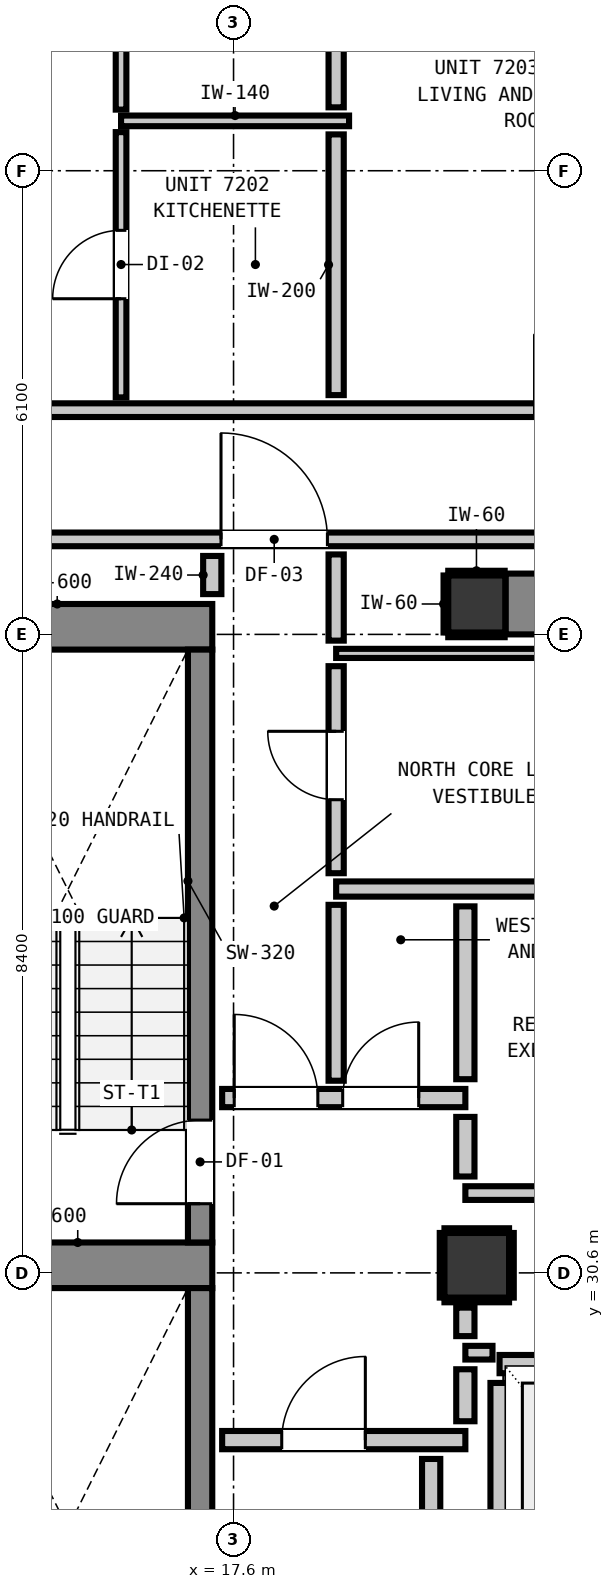
"""IFC4 building model, lengths in metres.
Left out: names, types, materials, properties, quantities, classifications, styles, units other than length and angle.
Written with IfcOpenShell. Run it as: python <this file> out.ifc"""

import sys

from ifc_helpers import new_model, si_unit, direction, frame, frame_2d, origin, origin_2d, place, context, subcontext, project, spatial, rectangle, extrude, element, fill, save


model = new_model("IFC4")
c1 = context("Model", 3, precision=1e-05, world=origin(), true_north=direction((0.0, 1.0)))
c2 = subcontext(c1, "Body", "Model", "MODEL_VIEW")
j1 = project(units=[si_unit("LENGTHUNIT", "METRE"), si_unit("PLANEANGLEUNIT", "RADIAN")], contexts=[c1])
p1 = place(None, origin())
s1 = spatial("IfcSite", under=j1, at=p1, CompositionType="ELEMENT")
p2 = place(p1, origin())
s2 = spatial("IfcBuilding", under=s1, at=p2, CompositionType="ELEMENT")
p3 = place(p2, frame((0.0, 0.0, 247.88)))
s3 = spatial("IfcBuildingStorey", under=s2, at=p3, CompositionType="ELEMENT", Elevation=247.88)
p4 = place(p3, frame((20.8, 39.4, 0.0), z_axis=(0.0, 0.0, 1.0), x_axis=(1.0, 0.0, 0.0)))
e1 = element("IfcColumn", 1, at=p4, inside=s3, PredefinedType="COLUMN", context=c2, shape_type="SweptSolid", body=[
    extrude(rectangle(XDim=0.75, YDim=0.75, at=origin_2d()), origin(), (0.0, 0.0, 1.0), 3.32),
])
p5 = place(p3, frame((13.24, 39.1, 0.0), z_axis=(0.0, 0.0, 1.0), x_axis=(1.0, 0.0, 0.0)))
e2 = element("IfcWall", 2, at=p5, inside=s3, PredefinedType="SHEAR", context=c2, shape_type="SweptSolid", body=[
    extrude(rectangle(XDim=4.08, YDim=0.6, at=frame_2d((2.04, 0.0))), origin(), (0.0, 0.0, 1.0), 3.32),
])
p6 = place(p3, frame((13.78, 30.7, 0.0), z_axis=(0.0, 0.0, 1.0), x_axis=(1.0, 0.0, 0.0)))
e3 = element("IfcWall", 3, at=p6, inside=s3, PredefinedType="SHEAR", context=c2, shape_type="SweptSolid", body=[
    extrude(rectangle(XDim=3.54, YDim=0.6, at=frame_2d((1.77, 0.0))), origin(), (0.0, 0.0, 1.0), 3.32),
])
p7 = place(p3, frame((21.18, 39.4, 0.0), z_axis=(0.0, 0.0, 1.0), x_axis=(1.0, 0.0, 0.0)))
e4 = element("IfcWall", 4, at=p7, inside=s3, PredefinedType="SHEAR", context=c2, shape_type="SweptSolid", body=[
    extrude(rectangle(XDim=7.64, YDim=0.8, at=frame_2d((3.82, 0.0))), origin(), (0.0, 0.0, 1.0), 3.32),
])
p8 = place(p3, frame((17.16, 31.0, 0.0), z_axis=(0.0, 0.0, 1.0), x_axis=(0.0, 1.0, 0.0)))
e5 = element("IfcWall", 5, at=p8, inside=s3, PredefinedType="SHEAR", context=c2, shape_type="SweptSolid", body=[
    extrude(rectangle(XDim=7.8, YDim=0.32, at=frame_2d((3.9, 0.0))), origin(), (0.0, 0.0, 1.0), 3.32),
])
p9 = place(p8, frame((0.51, 0.0, 0.0)))
e6 = element("IfcOpeningElement", 6, at=p9, cuts=e5, PredefinedType="OPENING", context=c2, shape_type="SweptSolid", body=[
    extrude(rectangle(XDim=1.1, YDim=2.15, at=frame_2d((0.55, 1.075))), frame((0.0, 0.17, 0.0), z_axis=(0.0, -1.0, 0.0), x_axis=(1.0, 0.0, 0.0)), (0.0, 0.0, 1.0), 0.34),
])
p10 = place(p3, frame((17.16, 22.4, 0.0), z_axis=(0.0, 0.0, 1.0), x_axis=(0.0, 1.0, 0.0)))
e7 = element("IfcWall", 7, at=p10, inside=s3, PredefinedType="SHEAR", context=c2, shape_type="SweptSolid", body=[
    extrude(rectangle(XDim=8.0, YDim=0.32, at=frame_2d((4.0, 0.0))), origin(), (0.0, 0.0, 1.0), 3.32),
])
p11 = place(p10, frame((0.39, 0.0, 0.0)))
e8 = element("IfcOpeningElement", 8, at=p11, cuts=e7, PredefinedType="OPENING", context=c2, shape_type="SweptSolid", body=[
    extrude(rectangle(XDim=1.1, YDim=2.15, at=frame_2d((0.55, 1.075))), frame((0.0, 0.17, 0.0), z_axis=(0.0, -1.0, 0.0), x_axis=(1.0, 0.0, 0.0)), (0.0, 0.0, 1.0), 0.34),
])
p12 = place(p3, frame((20.8, 30.7, 0.0), z_axis=(0.0, 0.0, 1.0), x_axis=(1.0, 0.0, 0.0)))
e9 = element("IfcColumn", 9, at=p12, inside=s3, PredefinedType="COLUMN", context=c2, shape_type="SweptSolid", body=[
    extrude(rectangle(XDim=0.85, YDim=0.85, at=origin_2d()), origin(), (0.0, 0.0, 1.0), 3.32),
])
p13 = place(p3, frame((21.1, 29.4, 0.0), z_axis=(0.0, 0.0, 1.0), x_axis=(1.0, 0.0, 0.0)))
e10 = element("IfcWall", 10, at=p13, inside=s3, PredefinedType="PARTITIONING", context=c2, shape_type="SweptSolid", body=[
    extrude(rectangle(XDim=2.2, YDim=0.24, at=frame_2d((1.1, 0.0))), origin(), (0.0, 0.0, 1.0), 2.9),
])
p14 = place(p3, frame((21.1, 27.048, 0.0), z_axis=(0.0, 0.0, 1.0), x_axis=(0.0, 1.0, 0.0)))
e11 = element("IfcWall", 11, at=p14, inside=s3, PredefinedType="PARTITIONING", context=c2, shape_type="SweptSolid", body=[
    extrude(rectangle(XDim=2.104, YDim=0.24, at=frame_2d((1.052, 0.0))), origin(), (0.0, 0.0, 1.0), 0.905),
])
p15 = place(p3, frame((17.45, 28.4, 0.0), z_axis=(0.0, 0.0, 1.0), x_axis=(1.0, 0.0, 0.0)))
e12 = element("IfcWall", 12, at=p15, inside=s3, PredefinedType="PARTITIONING", context=c2, shape_type="SweptSolid", body=[
    extrude(rectangle(XDim=3.2, YDim=0.24, at=frame_2d((1.6, 0.0))), origin(), (0.0, 0.0, 1.0), 2.9),
])
p16 = place(p15, frame((0.784, 0.0, 0.0)))
e13 = element("IfcOpeningElement", 13, at=p16, cuts=e12, PredefinedType="OPENING", context=c2, shape_type="SweptSolid", body=[
    extrude(rectangle(XDim=1.1, YDim=2.15, at=frame_2d((0.55, 1.075))), frame((0.0, 0.13, 0.0), z_axis=(0.0, -1.0, 0.0), x_axis=(1.0, 0.0, 0.0)), (0.0, 0.0, 1.0), 0.26),
])
p17 = place(p3, frame((17.45, 32.9, 0.0), z_axis=(0.0, 0.0, 1.0), x_axis=(1.0, 0.0, 0.0)))
e14 = element("IfcWall", 14, at=p17, inside=s3, PredefinedType="PARTITIONING", context=c2, shape_type="SweptSolid", body=[
    extrude(rectangle(XDim=3.2, YDim=0.24, at=frame_2d((1.6, 0.0))), origin(), (0.0, 0.0, 1.0), 2.9),
])
p18 = place(p17, frame((0.159, 0.0, 0.0)))
e15 = element("IfcOpeningElement", 15, at=p18, cuts=e14, PredefinedType="OPENING", context=c2, shape_type="SweptSolid", body=[
    extrude(rectangle(XDim=1.1, YDim=2.15, at=frame_2d((0.55, 1.075))), frame((0.0, 0.13, 0.0), z_axis=(0.0, -1.0, 0.0), x_axis=(1.0, 0.0, 0.0)), (0.0, 0.0, 1.0), 0.26),
])
p19 = place(p17, frame((1.586, 0.0, 0.0)))
e16 = element("IfcOpeningElement", 16, at=p19, cuts=e14, PredefinedType="OPENING", context=c2, shape_type="SweptSolid", body=[
    extrude(rectangle(XDim=1.0, YDim=2.15, at=frame_2d((0.5, 1.075))), frame((0.0, 0.13, 0.0), z_axis=(0.0, -1.0, 0.0), x_axis=(1.0, 0.0, 0.0)), (0.0, 0.0, 1.0), 0.26),
])
p20 = place(p3, frame((18.95, 35.65, 0.0), z_axis=(0.0, 0.0, 1.0), x_axis=(1.0, 0.0, 0.0)))
e17 = element("IfcWall", 17, at=p20, inside=s3, PredefinedType="PARTITIONING", context=c2, shape_type="SweptSolid", body=[
    extrude(rectangle(XDim=11.025, YDim=0.2, at=frame_2d((5.513, 0.0))), origin(), (0.0, 0.0, 1.0), 2.9),
])
p21 = place(p3, frame((20.65, 29.55, 0.0), z_axis=(0.0, 0.0, 1.0), x_axis=(1.0, 0.0, 0.0)))
e18 = element("IfcWall", 18, at=p21, inside=s3, PredefinedType="PARTITIONING", context=c2, shape_type="SweptSolid", body=[
    extrude(rectangle(XDim=0.357, YDim=0.18, at=frame_2d((0.179, 0.0))), origin(), (0.0, 0.0, 1.0), 2.9),
])
p22 = place(p3, frame((20.65, 31.65, 0.0), z_axis=(0.0, 0.0, 1.0), x_axis=(1.0, 0.0, 0.0)))
e19 = element("IfcWall", 19, at=p22, inside=s3, PredefinedType="PARTITIONING", context=c2, shape_type="SweptSolid", body=[
    extrude(rectangle(XDim=7.7, YDim=0.18, at=frame_2d((3.85, 0.0))), origin(), (0.0, 0.0, 1.0), 2.9),
])
p23 = place(p22, frame((4.673, 0.0, 0.0)))
e20 = element("IfcOpeningElement", 20, at=p23, cuts=e19, PredefinedType="OPENING", context=c2, shape_type="SweptSolid", body=[
    extrude(rectangle(XDim=0.9, YDim=2.1, at=frame_2d((0.45, 1.05))), frame((0.0, 0.1, 0.0), z_axis=(0.0, -1.0, 0.0), x_axis=(1.0, 0.0, 0.0)), (0.0, 0.0, 1.0), 0.2),
])
p24 = place(p3, frame((10.787, 40.25, 0.0), z_axis=(0.0, 0.0, 1.0), x_axis=(1.0, 0.0, 0.0)))
e21 = element("IfcWall", 21, at=p24, inside=s3, PredefinedType="PARTITIONING", context=c2, shape_type="SweptSolid", body=[
    extrude(rectangle(XDim=36.626, YDim=0.18, at=frame_2d((18.313, 0.0))), origin(), (0.0, 0.0, 1.0), 2.9),
])
p25 = place(p24, frame((6.648, 0.0, 0.0)))
e22 = element("IfcOpeningElement", 22, at=p25, cuts=e21, PredefinedType="OPENING", context=c2, shape_type="SweptSolid", body=[
    extrude(rectangle(XDim=1.4, YDim=2.15, at=frame_2d((0.7, 1.075))), frame((0.0, 0.1, 0.0), z_axis=(0.0, -1.0, 0.0), x_axis=(1.0, 0.0, 0.0)), (0.0, 0.0, 1.0), 0.2),
])
p26 = place(p24, frame((31.314, 0.0, 0.0)))
e23 = element("IfcOpeningElement", 23, at=p26, cuts=e21, PredefinedType="OPENING", context=c2, shape_type="SweptSolid", body=[
    extrude(rectangle(XDim=0.9, YDim=2.1, at=frame_2d((0.45, 1.05))), frame((0.0, 0.1, 0.0), z_axis=(0.0, -1.0, 0.0), x_axis=(1.0, 0.0, 0.0)), (0.0, 0.0, 1.0), 0.2),
])
p27 = place(p3, frame((10.787, 41.95, 0.0), z_axis=(0.0, 0.0, 1.0), x_axis=(1.0, 0.0, 0.0)))
e24 = element("IfcWall", 24, at=p27, inside=s3, PredefinedType="PARTITIONING", context=c2, shape_type="SweptSolid", body=[
    extrude(rectangle(XDim=36.626, YDim=0.18, at=frame_2d((18.313, 0.0))), origin(), (0.0, 0.0, 1.0), 2.9),
])
p28 = place(p27, frame((3.397, 0.0, 0.0)))
e25 = element("IfcOpeningElement", 25, at=p28, cuts=e24, PredefinedType="OPENING", context=c2, shape_type="SweptSolid", body=[
    extrude(rectangle(XDim=1.0, YDim=2.15, at=frame_2d((0.5, 1.075))), frame((0.0, 0.1, 0.0), z_axis=(0.0, -1.0, 0.0), x_axis=(1.0, 0.0, 0.0)), (0.0, 0.0, 1.0), 0.2),
])
p29 = place(p27, frame((10.773, 0.0, 0.0)))
e26 = element("IfcOpeningElement", 26, at=p29, cuts=e24, PredefinedType="OPENING", context=c2, shape_type="SweptSolid", body=[
    extrude(rectangle(XDim=1.0, YDim=2.15, at=frame_2d((0.5, 1.075))), frame((0.0, 0.1, 0.0), z_axis=(0.0, -1.0, 0.0), x_axis=(1.0, 0.0, 0.0)), (0.0, 0.0, 1.0), 0.2),
])
p30 = place(p27, frame((19.136, 0.0, 0.0)))
e27 = element("IfcOpeningElement", 27, at=p30, cuts=e24, PredefinedType="OPENING", context=c2, shape_type="SweptSolid", body=[
    extrude(rectangle(XDim=1.0, YDim=2.15, at=frame_2d((0.5, 1.075))), frame((0.0, 0.1, 0.0), z_axis=(0.0, -1.0, 0.0), x_axis=(1.0, 0.0, 0.0)), (0.0, 0.0, 1.0), 0.2),
])
p31 = place(p27, frame((28.323, 0.0, 0.0)))
e28 = element("IfcOpeningElement", 28, at=p31, cuts=e24, PredefinedType="OPENING", context=c2, shape_type="SweptSolid", body=[
    extrude(rectangle(XDim=1.0, YDim=2.15, at=frame_2d((0.5, 1.075))), frame((0.0, 0.1, 0.0), z_axis=(0.0, -1.0, 0.0), x_axis=(1.0, 0.0, 0.0)), (0.0, 0.0, 1.0), 0.2),
])
p32 = place(p3, frame((16.12, 45.756, 0.0), z_axis=(0.0, 0.0, 1.0), x_axis=(1.0, 0.0, 0.0)))
e29 = element("IfcWall", 29, at=p32, inside=s3, PredefinedType="PARTITIONING", context=c2, shape_type="SweptSolid", body=[
    extrude(rectangle(XDim=3.0, YDim=0.14, at=frame_2d((1.5, 0.0))), origin(), (0.0, 0.0, 1.0), 2.9),
])
p33 = place(p3, frame((18.95, 38.75, 0.0), z_axis=(0.0, 0.0, 1.0), x_axis=(1.0, 0.0, 0.0)))
e30 = element("IfcWall", 30, at=p33, inside=s3, PredefinedType="PARTITIONING", context=c2, shape_type="SweptSolid", body=[
    extrude(rectangle(XDim=13.56, YDim=0.12, at=frame_2d((6.78, 0.0))), origin(), (0.0, 0.0, 1.0), 0.905),
])
p34 = place(p3, frame((17.32, 39.53, 0.0), z_axis=(0.0, 0.0, 1.0), x_axis=(0.0, 1.0, 0.0)))
e31 = element("IfcWall", 31, at=p34, inside=s3, PredefinedType="PARTITIONING", context=c2, shape_type="SweptSolid", body=[
    extrude(rectangle(XDim=0.502, YDim=0.24, at=frame_2d((0.251, 0.0))), origin(), (0.0, 0.0, 1.0), 2.9),
])
p35 = place(p3, frame((20.2, 21.398, 0.0), z_axis=(0.0, 0.0, 1.0), x_axis=(0.0, 1.0, 0.0)))
e32 = element("IfcWall", 32, at=p35, inside=s3, PredefinedType="PARTITIONING", context=c2, shape_type="SweptSolid", body=[
    extrude(rectangle(XDim=6.754, YDim=0.24, at=frame_2d((3.377, 0.0))), origin(), (0.0, 0.0, 1.0), 0.905),
])
p36 = place(p3, frame((20.65, 28.648, 0.0), z_axis=(0.0, 0.0, 1.0), x_axis=(0.0, 1.0, 0.0)))
e33 = element("IfcWall", 33, at=p36, inside=s3, PredefinedType="PARTITIONING", context=c2, shape_type="SweptSolid", body=[
    extrude(rectangle(XDim=0.684, YDim=0.24, at=frame_2d((0.342, 0.0))), origin(), (0.0, 0.0, 1.0), 0.905),
])
p37 = place(p3, frame((20.65, 29.768, 0.0), z_axis=(0.0, 0.0, 1.0), x_axis=(0.0, 1.0, 0.0)))
e34 = element("IfcWall", 34, at=p37, inside=s3, PredefinedType="PARTITIONING", context=c2, shape_type="SweptSolid", body=[
    extrude(rectangle(XDim=0.375, YDim=0.24, at=frame_2d((0.188, 0.0))), origin(), (0.0, 0.0, 1.0), 0.905),
])
p38 = place(p3, frame((20.65, 31.868, 0.0), z_axis=(0.0, 0.0, 1.0), x_axis=(0.0, 1.0, 0.0)))
e35 = element("IfcWall", 35, at=p38, inside=s3, PredefinedType="PARTITIONING", context=c2, shape_type="SweptSolid", body=[
    extrude(rectangle(XDim=0.784, YDim=0.24, at=frame_2d((0.392, 0.0))), origin(), (0.0, 0.0, 1.0), 0.905),
])
p39 = place(p3, frame((20.65, 33.148, 0.0), z_axis=(0.0, 0.0, 1.0), x_axis=(0.0, 1.0, 0.0)))
e36 = element("IfcWall", 36, at=p39, inside=s3, PredefinedType="PARTITIONING", context=c2, shape_type="SweptSolid", body=[
    extrude(rectangle(XDim=2.274, YDim=0.24, at=frame_2d((1.137, 0.0))), origin(), (0.0, 0.0, 1.0), 0.905),
])
p40 = place(p3, frame((18.95, 33.128, 0.0), z_axis=(0.0, 0.0, 1.0), x_axis=(0.0, 1.0, 0.0)))
e37 = element("IfcWall", 37, at=p40, inside=s3, PredefinedType="PARTITIONING", context=c2, shape_type="SweptSolid", body=[
    extrude(rectangle(XDim=2.314, YDim=0.2, at=frame_2d((1.157, 0.0))), origin(), (0.0, 0.0, 1.0), 2.9),
])
p41 = place(p3, frame((18.95, 35.858, 0.0), z_axis=(0.0, 0.0, 1.0), x_axis=(0.0, 1.0, 0.0)))
e38 = element("IfcWall", 38, at=p41, inside=s3, PredefinedType="PARTITIONING", context=c2, shape_type="SweptSolid", body=[
    extrude(rectangle(XDim=2.724, YDim=0.2, at=frame_2d((1.362, 0.0))), origin(), (0.0, 0.0, 1.0), 2.9),
])
p42 = place(p41, frame((0.967, 0.0, 0.0)))
e39 = element("IfcOpeningElement", 39, at=p42, cuts=e38, PredefinedType="OPENING", context=c2, shape_type="SweptSolid", body=[
    extrude(rectangle(XDim=0.9, YDim=2.1, at=frame_2d((0.45, 1.05))), frame((0.0, 0.11, 0.0), z_axis=(0.0, -1.0, 0.0), x_axis=(1.0, 0.0, 0.0)), (0.0, 0.0, 1.0), 0.22),
])
p43 = place(p3, frame((18.95, 38.918, 0.0), z_axis=(0.0, 0.0, 1.0), x_axis=(0.0, 1.0, 0.0)))
e40 = element("IfcWall", 40, at=p43, inside=s3, PredefinedType="PARTITIONING", context=c2, shape_type="SweptSolid", body=[
    extrude(rectangle(XDim=1.134, YDim=0.2, at=frame_2d((0.567, 0.0))), origin(), (0.0, 0.0, 1.0), 2.9),
])
p44 = place(p3, frame((18.95, 42.148, 0.0), z_axis=(0.0, 0.0, 1.0), x_axis=(0.0, 1.0, 0.0)))
e41 = element("IfcWall", 41, at=p44, inside=s3, PredefinedType="PARTITIONING", context=c2, shape_type="SweptSolid", body=[
    extrude(rectangle(XDim=3.43, YDim=0.2, at=frame_2d((1.715, 0.0))), origin(), (0.0, 0.0, 1.0), 2.9),
])
p45 = place(p3, frame((18.95, 45.934, 0.0), z_axis=(0.0, 0.0, 1.0), x_axis=(0.0, 1.0, 0.0)))
e42 = element("IfcWall", 42, at=p45, inside=s3, PredefinedType="PARTITIONING", context=c2, shape_type="SweptSolid", body=[
    extrude(rectangle(XDim=4.879, YDim=0.2, at=frame_2d((2.439, 0.0))), origin(), (0.0, 0.0, 1.0), 2.9),
])
p46 = place(p3, frame((16.12, 42.118, 0.0), z_axis=(0.0, 0.0, 1.0), x_axis=(0.0, 1.0, 0.0)))
e43 = element("IfcWall", 43, at=p46, inside=s3, PredefinedType="PARTITIONING", context=c2, shape_type="SweptSolid", body=[
    extrude(rectangle(XDim=3.49, YDim=0.14, at=frame_2d((1.745, 0.0))), origin(), (0.0, 0.0, 1.0), 2.9),
])
p47 = place(p46, frame((1.298, 0.0, 0.0)))
e44 = element("IfcOpeningElement", 44, at=p47, cuts=e43, PredefinedType="OPENING", context=c2, shape_type="SweptSolid", body=[
    extrude(rectangle(XDim=0.9, YDim=2.1, at=frame_2d((0.45, 1.05))), frame((0.0, 0.08, 0.0), z_axis=(0.0, -1.0, 0.0), x_axis=(1.0, 0.0, 0.0)), (0.0, 0.0, 1.0), 0.16),
])
p48 = place(p3, frame((16.12, 45.904, 0.0), z_axis=(0.0, 0.0, 1.0), x_axis=(0.0, 1.0, 0.0)))
e45 = element("IfcWall", 45, at=p48, inside=s3, PredefinedType="PARTITIONING", context=c2, shape_type="SweptSolid", body=[
    extrude(rectangle(XDim=4.909, YDim=0.14, at=frame_2d((2.455, 0.0))), origin(), (0.0, 0.0, 1.0), 2.9),
])
p49 = place(p48, frame((1.931, 0.0, 0.0)))
e46 = element("IfcOpeningElement", 46, at=p49, cuts=e45, PredefinedType="OPENING", context=c2, shape_type="SweptSolid", body=[
    extrude(rectangle(XDim=0.86, YDim=2.02, at=frame_2d((0.43, 1.01))), frame((0.0, 0.08, 0.0), z_axis=(0.0, -1.0, 0.0), x_axis=(1.0, 0.0, 0.0)), (0.0, 0.0, 1.0), 0.16),
])
for number, where, z_axis, x_axis in (
    (47, (20.425, 38.993, 0.0), (0.0, 0.0, 1.0), (1.0, 0.0, 0.0)),
    (48, (20.425, 39.807, 0.0), (0.0, 0.0, 1.0), (1.0, 0.0, 0.0)),
):
    element("IfcWall", number, at=place(p3, frame(where, z_axis=z_axis, x_axis=x_axis)), inside=s3, PredefinedType="PARTITIONING", context=c2, shape_type="SweptSolid", body=[
        extrude(rectangle(XDim=0.742, YDim=0.06, at=frame_2d((0.371, 0.0))), origin(), (0.0, 0.0, 1.0), 0.905),
    ])
p50 = place(p3, frame((20.393, 39.025, 0.0), z_axis=(0.0, 0.0, 1.0), x_axis=(0.0, 1.0, 0.0)))
e49 = element("IfcWall", 49, at=p50, inside=s3, PredefinedType="PARTITIONING", context=c2, shape_type="SweptSolid", body=[
    extrude(rectangle(XDim=0.75, YDim=0.06, at=frame_2d((0.375, 0.0))), origin(), (0.0, 0.0, 1.0), 0.905),
])
for number, where, z_axis, x_axis in (
    (50, (20.375, 30.243, 0.0), (0.0, 0.0, 1.0), (1.0, 0.0, 0.0)),
    (51, (20.375, 31.157, 0.0), (0.0, 0.0, 1.0), (1.0, 0.0, 0.0)),
    (52, (20.343, 30.275, 0.0), (0.0, 0.0, 1.0), (0.0, 1.0, 0.0)),
    (53, (21.257, 30.275, 0.0), (0.0, 0.0, 1.0), (0.0, 1.0, 0.0)),
):
    element("IfcWall", number, at=place(p3, frame(where, z_axis=z_axis, x_axis=x_axis)), inside=s3, PredefinedType="PARTITIONING", context=c2, shape_type="SweptSolid", body=[
        extrude(rectangle(XDim=0.85, YDim=0.06, at=frame_2d((0.425, 0.0))), origin(), (0.0, 0.0, 1.0), 0.905),
    ])
p51 = place(p9, origin())
e54 = element("IfcDoor", 54, at=p51, inside=s3, OperationType="SINGLE_SWING_LEFT", PredefinedType="DOOR", context=c2, shape_type="SweptSolid", body=[
    extrude(rectangle(XDim=1.1, YDim=2.15, at=frame_2d((0.55, 1.075))), frame((0.0, 0.025, 0.0), z_axis=(0.0, -1.0, 0.0), x_axis=(1.0, 0.0, 0.0)), (0.0, 0.0, 1.0), 0.05),
])
fill(e6, e54)
p52 = place(p16, origin())
e55 = element("IfcDoor", 55, at=p52, inside=s3, OperationType="SINGLE_SWING_RIGHT", PredefinedType="DOOR", context=c2, shape_type="SweptSolid", body=[
    extrude(rectangle(XDim=1.1, YDim=2.15, at=frame_2d((0.55, 1.075))), frame((0.0, 0.025, 0.0), z_axis=(0.0, -1.0, 0.0), x_axis=(1.0, 0.0, 0.0)), (0.0, 0.0, 1.0), 0.05),
])
fill(e13, e55)
p53 = place(p18, origin())
e56 = element("IfcDoor", 56, at=p53, inside=s3, OperationType="SINGLE_SWING_LEFT", PredefinedType="DOOR", context=c2, shape_type="SweptSolid", body=[
    extrude(rectangle(XDim=1.1, YDim=2.15, at=frame_2d((0.55, 1.075))), frame((0.0, 0.025, 0.0), z_axis=(0.0, -1.0, 0.0), x_axis=(1.0, 0.0, 0.0)), (0.0, 0.0, 1.0), 0.05),
])
fill(e15, e56)
p54 = place(p25, origin())
e57 = element("IfcDoor", 57, at=p54, inside=s3, OperationType="SINGLE_SWING_LEFT", PredefinedType="DOOR", context=c2, shape_type="SweptSolid", body=[
    extrude(rectangle(XDim=1.4, YDim=2.15, at=frame_2d((0.7, 1.075))), frame((0.0, 0.025, 0.0), z_axis=(0.0, -1.0, 0.0), x_axis=(1.0, 0.0, 0.0)), (0.0, 0.0, 1.0), 0.05),
])
fill(e22, e57)
p55 = place(p19, origin())
e58 = element("IfcDoor", 58, at=p55, inside=s3, OperationType="SINGLE_SWING_RIGHT", PredefinedType="DOOR", context=c2, shape_type="SweptSolid", body=[
    extrude(rectangle(XDim=1.0, YDim=2.15, at=frame_2d((0.5, 1.075))), frame((0.0, 0.025, 0.0), z_axis=(0.0, -1.0, 0.0), x_axis=(1.0, 0.0, 0.0)), (0.0, 0.0, 1.0), 0.05),
])
fill(e16, e58)
p56 = place(p42, origin())
e59 = element("IfcDoor", 59, at=p56, inside=s3, OperationType="SINGLE_SWING_RIGHT", PredefinedType="DOOR", context=c2, shape_type="SweptSolid", body=[
    extrude(rectangle(XDim=0.9, YDim=2.1, at=frame_2d((0.45, 1.05))), frame((0.0, 0.025, 0.0), z_axis=(0.0, -1.0, 0.0), x_axis=(1.0, 0.0, 0.0)), (0.0, 0.0, 1.0), 0.05),
])
fill(e39, e59)
p57 = place(p47, origin())
e60 = element("IfcDoor", 60, at=p57, inside=s3, OperationType="SINGLE_SWING_LEFT", PredefinedType="DOOR", context=c2, shape_type="SweptSolid", body=[
    extrude(rectangle(XDim=0.9, YDim=2.1, at=frame_2d((0.45, 1.05))), frame((0.0, 0.025, 0.0), z_axis=(0.0, -1.0, 0.0), x_axis=(1.0, 0.0, 0.0)), (0.0, 0.0, 1.0), 0.05),
])
fill(e44, e60)
save(model, sys.argv[1])
